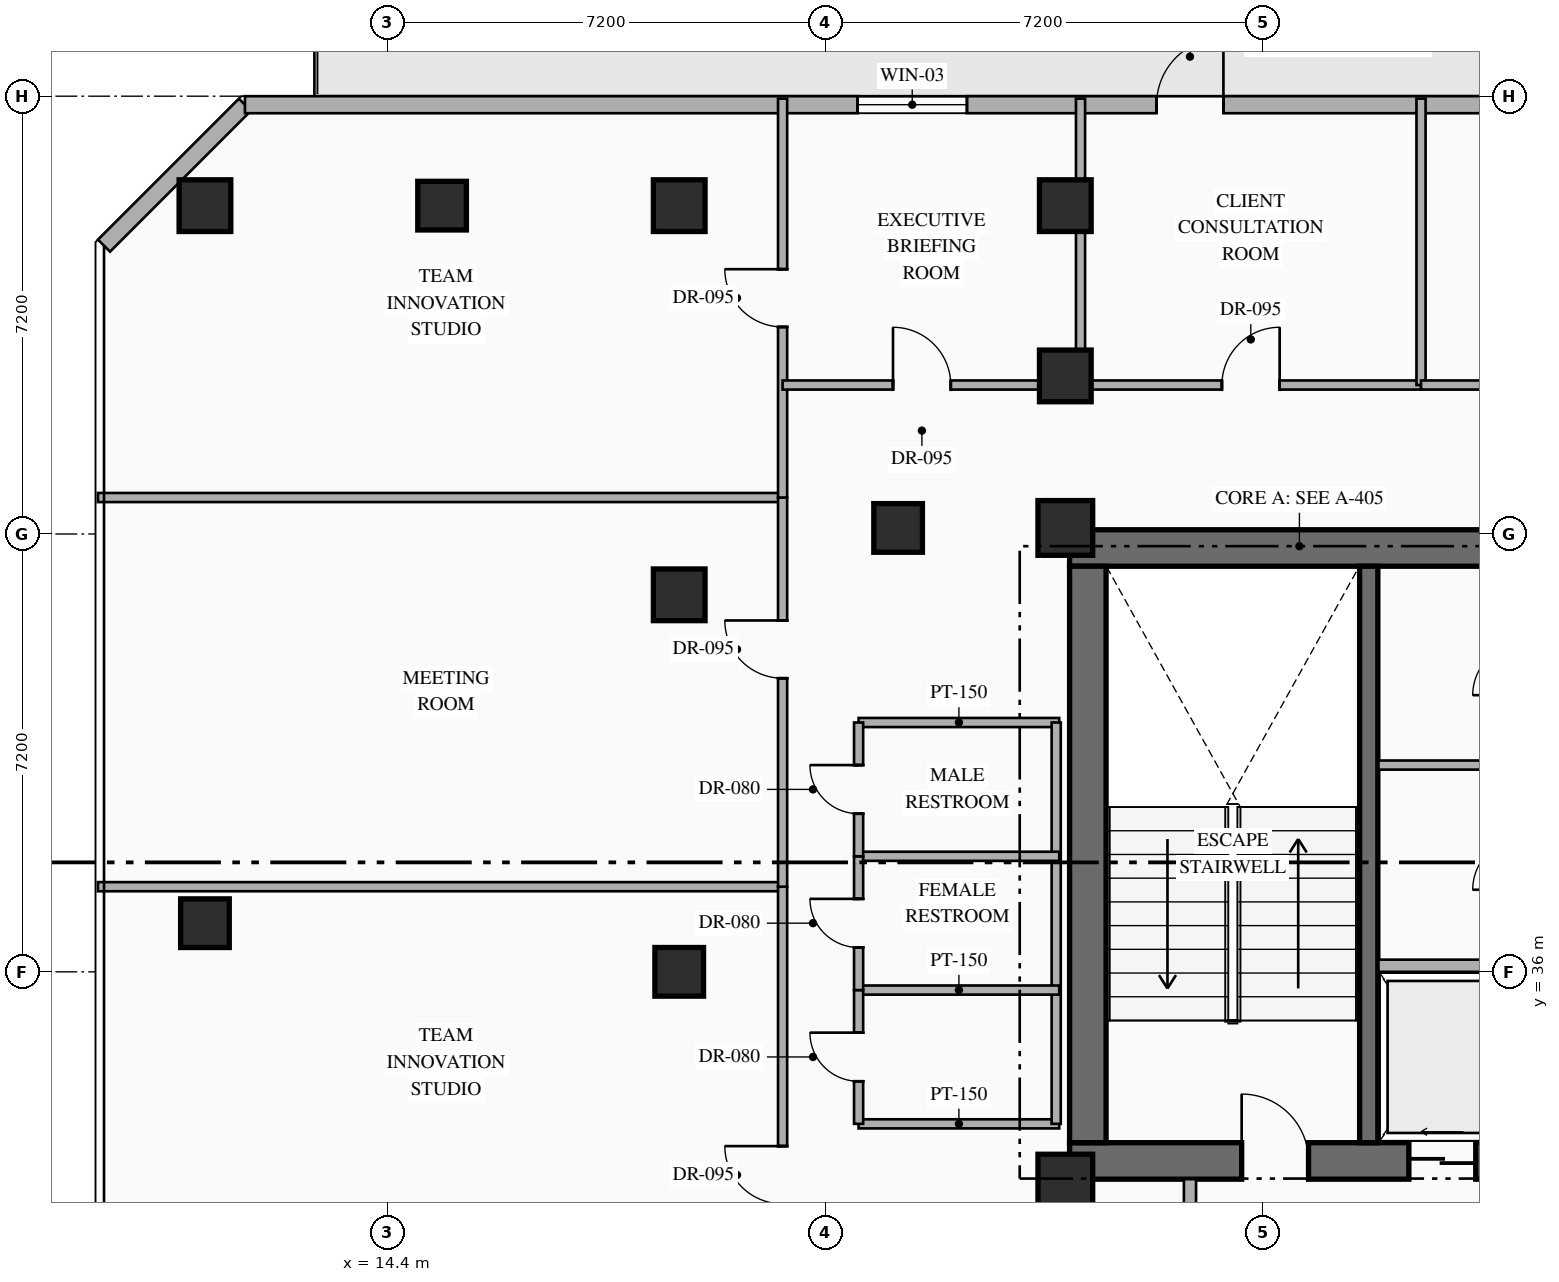
"""IFC4 building model, lengths in metres.
Left out: names, types, materials, properties, quantities, classifications, styles, units other than length and angle.
Written with IfcOpenShell. Run it as: python <this file> out.ifc"""

import sys

from ifc_helpers import new_model, si_unit, direction, frame, frame_2d, origin, origin_2d, place, context, subcontext, project, spatial, rectangle, hollow_rectangle, extrude, element, fill, save


model = new_model("IFC4")
c1 = context("Model", 3, precision=1e-05, world=origin(), true_north=direction((0.0, 1.0)))
c2 = subcontext(c1, "Body", "Model", "MODEL_VIEW")
j1 = project(units=[si_unit("LENGTHUNIT", "METRE"), si_unit("PLANEANGLEUNIT", "RADIAN")], contexts=[c1])
p1 = place(None, origin())
s1 = spatial("IfcSite", under=j1, at=p1, CompositionType="ELEMENT")
p2 = place(p1, origin())
s2 = spatial("IfcBuilding", under=s1, at=p2, CompositionType="ELEMENT")
p3 = place(p2, frame((0.0, 0.0, 145.65)))
s3 = spatial("IfcBuildingStorey", under=s2, at=p3, CompositionType="ELEMENT", Elevation=145.65)
p4 = place(p3, frame((25.62, 32.89, 0.0), z_axis=(0.0, 0.0, 1.0), x_axis=(1.0, 0.0, 0.0)))
e1 = element("IfcWall", 1, at=p4, inside=s3, PredefinedType="SHEAR", context=c2, shape_type="SweptSolid", body=[
    extrude(rectangle(XDim=7.78, YDim=0.6, at=frame_2d((3.89, 0.0))), origin(), (0.0, 0.0, 1.0), 3.6),
])
p5 = place(p4, frame((2.83, 0.0, 0.0)))
e2 = element("IfcOpeningElement", 2, at=p5, cuts=e1, PredefinedType="OPENING", context=c2, shape_type="SweptSolid", body=[
    extrude(rectangle(XDim=1.1, YDim=2.2, at=frame_2d((0.55, 1.1))), frame((0.0, 0.31, 0.0), z_axis=(0.0, -1.0, 0.0), x_axis=(1.0, 0.0, 0.0)), (0.0, 0.0, 1.0), 0.62),
])
p6 = place(p4, frame((5.58, 0.0, 0.0)))
e3 = element("IfcOpeningElement", 3, at=p6, cuts=e1, PredefinedType="OPENING", context=c2, shape_type="SweptSolid", body=[
    extrude(rectangle(XDim=1.1, YDim=2.15, at=frame_2d((0.55, 1.075))), frame((0.0, 0.31, 0.0), z_axis=(0.0, -1.0, 0.0), x_axis=(1.0, 0.0, 0.0)), (0.0, 0.0, 1.0), 0.62),
])
p7 = place(p3, frame((25.62, 42.97, 0.0), z_axis=(0.0, 0.0, 1.0), x_axis=(1.0, 0.0, 0.0)))
e4 = element("IfcWall", 4, at=p7, inside=s3, PredefinedType="SHEAR", context=c2, shape_type="SweptSolid", body=[
    extrude(rectangle(XDim=7.78, YDim=0.6, at=frame_2d((3.89, 0.0))), origin(), (0.0, 0.0, 1.0), 3.6),
])
p8 = place(p3, frame((25.92, 33.19, 0.0), z_axis=(0.0, 0.0, 1.0), x_axis=(0.0, 1.0, 0.0)))
e5 = element("IfcWall", 5, at=p8, inside=s3, PredefinedType="SHEAR", context=c2, shape_type="SweptSolid", body=[
    extrude(rectangle(XDim=9.48, YDim=0.6, at=frame_2d((4.74, 0.0))), origin(), (0.0, 0.0, 1.0), 3.6),
])
p9 = place(p3, frame((30.54, 33.19, 0.0), z_axis=(0.0, 0.0, 1.0), x_axis=(0.0, 1.0, 0.0)))
e6 = element("IfcWall", 6, at=p9, inside=s3, PredefinedType="SHEAR", context=c2, shape_type="SweptSolid", body=[
    extrude(rectangle(XDim=9.48, YDim=0.3, at=frame_2d((4.74, 0.0))), origin(), (0.0, 0.0, 1.0), 3.6),
])
for number, where, z_axis, x_axis in (
    (7, (25.55, 32.55, 0.0), (0.0, 0.0, 1.0), (1.0, 0.0, 0.0)),
    (8, (25.55, 43.3, 0.0), (0.0, 0.0, 1.0), (1.0, 0.0, 0.0)),
):
    element("IfcColumn", number, at=place(p3, frame(where, z_axis=z_axis, x_axis=x_axis)), inside=s3, PredefinedType="COLUMN", context=c2, shape_type="SweptSolid", body=[
        extrude(rectangle(XDim=0.9, YDim=0.9, at=origin_2d()), origin(), (0.0, 0.0, 1.0), 3.6),
    ])
for number, where, z_axis, x_axis in (
    (9, (25.55, 45.8, 0.0), (0.0, 0.0, 1.0), (1.0, 0.0, 0.0)),
    (10, (11.4, 48.6, 0.0), (0.0, 0.0, 1.0), (1.0, 0.0, 0.0)),
    (11, (19.2, 48.6, 0.0), (0.0, 0.0, 1.0), (1.0, 0.0, 0.0)),
    (12, (25.55, 48.6, 0.0), (0.0, 0.0, 1.0), (1.0, 0.0, 0.0)),
    (13, (19.2, 42.2, 0.0), (0.0, 0.0, 1.0), (1.0, 0.0, 0.0)),
):
    element("IfcColumn", number, at=place(p3, frame(where, z_axis=z_axis, x_axis=x_axis)), inside=s3, PredefinedType="COLUMN", context=c2, shape_type="SweptSolid", body=[
        extrude(hollow_rectangle(XDim=0.85, YDim=0.85, WallThickness=0.032, at=origin_2d()), origin(), (0.0, 0.0, 1.0), 3.6),
    ])
for number, where, z_axis, x_axis in (
    (14, (22.8, 43.3, 0.0), (0.0, 0.0, 1.0), (1.0, 0.0, 0.0)),
    (15, (11.4, 36.8, 0.0), (0.0, 0.0, 1.0), (1.0, 0.0, 0.0)),
    (16, (19.2, 36.0, 0.0), (0.0, 0.0, 1.0), (1.0, 0.0, 0.0)),
    (17, (15.3, 48.6, 0.0), (0.0, 0.0, 1.0), (1.0, 0.0, 0.0)),
):
    element("IfcColumn", number, at=place(p3, frame(where, z_axis=z_axis, x_axis=x_axis)), inside=s3, PredefinedType="COLUMN", context=c2, shape_type="SweptSolid", body=[
        extrude(hollow_rectangle(XDim=0.8, YDim=0.8, WallThickness=0.032, at=origin_2d()), origin(), (0.0, 0.0, 1.0), 3.6),
    ])
p10 = place(p3, frame((9.74, 47.942, 0.0), z_axis=(0.0, 0.0, 1.0), x_axis=(0.707106781187, 0.707106781187, 0.0)))
e18 = element("IfcWall", 18, at=p10, inside=s3, PredefinedType="STANDARD", context=c2, shape_type="SweptSolid", body=[
    extrude(rectangle(XDim=3.278, YDim=0.28, at=frame_2d((1.639, 0.0))), origin(), (0.0, 0.0, 1.0), 3.35),
])
p11 = place(p3, frame((12.058, 50.26, 0.0), z_axis=(0.0, 0.0, 1.0), x_axis=(1.0, 0.0, 0.0)))
e19 = element("IfcWall", 19, at=p11, inside=s3, PredefinedType="STANDARD", context=c2, shape_type="SweptSolid", body=[
    extrude(rectangle(XDim=30.484, YDim=0.28, at=frame_2d((15.242, 0.0))), origin(), (0.0, 0.0, 1.0), 3.35),
])
p12 = place(p11, frame((14.992, 0.0, 0.0)))
e20 = element("IfcOpeningElement", 20, at=p12, cuts=e19, PredefinedType="OPENING", context=c2, shape_type="SweptSolid", body=[
    extrude(rectangle(XDim=1.1, YDim=2.2, at=frame_2d((0.55, 1.1))), frame((0.0, 0.15, 0.0), z_axis=(0.0, -1.0, 0.0), x_axis=(1.0, 0.0, 0.0)), (0.0, 0.0, 1.0), 0.3),
])
p13 = place(p11, frame((10.074, 0.0, 0.85)))
e21 = element("IfcOpeningElement", 21, at=p13, cuts=e19, PredefinedType="OPENING", context=c2, shape_type="SweptSolid", body=[
    extrude(rectangle(XDim=1.8, YDim=2.1, at=frame_2d((0.9, 1.05))), frame((0.0, 0.15, 0.0), z_axis=(0.0, -1.0, 0.0), x_axis=(1.0, 0.0, 0.0)), (0.0, 0.0, 1.0), 0.3),
])
p14 = place(p3, frame((30.7, 36.1, 0.0), z_axis=(0.0, 0.0, 1.0), x_axis=(1.0, 0.0, 0.0)))
e22 = element("IfcWall", 22, at=p14, inside=s3, PredefinedType="STANDARD", context=c2, shape_type="SweptSolid", body=[
    extrude(rectangle(XDim=2.1, YDim=0.2, at=frame_2d((1.05, 0.0))), origin(), (0.0, 0.0, 1.0), 3.35),
])
p15 = place(p3, frame((30.7, 39.4, 0.0), z_axis=(0.0, 0.0, 1.0), x_axis=(1.0, 0.0, 0.0)))
e23 = element("IfcWall", 23, at=p15, inside=s3, PredefinedType="PARTITIONING", context=c2, shape_type="SweptSolid", body=[
    extrude(rectangle(XDim=2.1, YDim=0.15, at=frame_2d((1.05, 0.0))), origin(), (0.0, 0.0, 1.0), 3.35),
])
p16 = place(p3, frame((27.6, 29.2, 0.0), z_axis=(0.0, 0.0, 1.0), x_axis=(0.0, 1.0, 0.0)))
e24 = element("IfcWall", 24, at=p16, inside=s3, PredefinedType="STANDARD", context=c2, shape_type="SweptSolid", body=[
    extrude(rectangle(XDim=3.39, YDim=0.2, at=frame_2d((1.695, 0.0))), origin(), (0.0, 0.0, 1.0), 3.35),
])
for number, where, z_axis, x_axis in (
    (25, (22.15, 33.5, 0.0), (0.0, 0.0, 1.0), (1.0, 0.0, 0.0)),
    (26, (22.15, 40.1, 0.0), (0.0, 0.0, 1.0), (1.0, 0.0, 0.0)),
):
    element("IfcWall", number, at=place(p3, frame(where, z_axis=z_axis, x_axis=x_axis)), inside=s3, PredefinedType="PARTITIONING", context=c2, shape_type="SweptSolid", body=[
        extrude(rectangle(XDim=3.3, YDim=0.15, at=frame_2d((1.65, 0.0))), origin(), (0.0, 0.0, 1.0), 3.35),
    ])
p17 = place(p3, frame((25.4, 33.5, 0.0), z_axis=(0.0, 0.0, 1.0), x_axis=(0.0, 1.0, 0.0)))
e27 = element("IfcWall", 27, at=p17, inside=s3, PredefinedType="PARTITIONING", context=c2, shape_type="SweptSolid", body=[
    extrude(rectangle(XDim=6.6, YDim=0.15, at=frame_2d((3.3, 0.0))), origin(), (0.0, 0.0, 1.0), 3.35),
])
for number, where, z_axis, x_axis in (
    (28, (22.15, 35.7, 0.0), (0.0, 0.0, 1.0), (1.0, 0.0, 0.0)),
    (29, (22.15, 37.9, 0.0), (0.0, 0.0, 1.0), (1.0, 0.0, 0.0)),
):
    element("IfcWall", number, at=place(p3, frame(where, z_axis=z_axis, x_axis=x_axis)), inside=s3, PredefinedType="PARTITIONING", context=c2, shape_type="SweptSolid", body=[
        extrude(rectangle(XDim=3.3, YDim=0.15, at=frame_2d((1.65, 0.0))), origin(), (0.0, 0.0, 1.0), 3.35),
    ])
p18 = place(p3, frame((22.15, 33.5, 0.0), z_axis=(0.0, 0.0, 1.0), x_axis=(0.0, 1.0, 0.0)))
e30 = element("IfcWall", 30, at=p18, inside=s3, PredefinedType="PARTITIONING", context=c2, shape_type="SweptSolid", body=[
    extrude(rectangle(XDim=2.2, YDim=0.15, at=frame_2d((1.1, 0.0))), origin(), (0.0, 0.0, 1.0), 3.35),
])
p19 = place(p18, frame((0.7, 0.0, 0.0)))
e31 = element("IfcOpeningElement", 31, at=p19, cuts=e30, PredefinedType="OPENING", context=c2, shape_type="SweptSolid", body=[
    extrude(rectangle(XDim=0.8, YDim=2.06, at=frame_2d((0.4, 1.03))), frame((0.0, 0.085, 0.0), z_axis=(0.0, -1.0, 0.0), x_axis=(1.0, 0.0, 0.0)), (0.0, 0.0, 1.0), 0.17),
])
p20 = place(p3, frame((22.15, 35.7, 0.0), z_axis=(0.0, 0.0, 1.0), x_axis=(0.0, 1.0, 0.0)))
e32 = element("IfcWall", 32, at=p20, inside=s3, PredefinedType="PARTITIONING", context=c2, shape_type="SweptSolid", body=[
    extrude(rectangle(XDim=2.2, YDim=0.15, at=frame_2d((1.1, 0.0))), origin(), (0.0, 0.0, 1.0), 3.35),
])
p21 = place(p20, frame((0.7, 0.0, 0.0)))
e33 = element("IfcOpeningElement", 33, at=p21, cuts=e32, PredefinedType="OPENING", context=c2, shape_type="SweptSolid", body=[
    extrude(rectangle(XDim=0.8, YDim=2.06, at=frame_2d((0.4, 1.03))), frame((0.0, 0.085, 0.0), z_axis=(0.0, -1.0, 0.0), x_axis=(1.0, 0.0, 0.0)), (0.0, 0.0, 1.0), 0.17),
])
p22 = place(p3, frame((22.15, 37.9, 0.0), z_axis=(0.0, 0.0, 1.0), x_axis=(0.0, 1.0, 0.0)))
e34 = element("IfcWall", 34, at=p22, inside=s3, PredefinedType="PARTITIONING", context=c2, shape_type="SweptSolid", body=[
    extrude(rectangle(XDim=2.2, YDim=0.15, at=frame_2d((1.1, 0.0))), origin(), (0.0, 0.0, 1.0), 3.35),
])
p23 = place(p22, frame((0.7, 0.0, 0.0)))
e35 = element("IfcOpeningElement", 35, at=p23, cuts=e34, PredefinedType="OPENING", context=c2, shape_type="SweptSolid", body=[
    extrude(rectangle(XDim=0.8, YDim=2.06, at=frame_2d((0.4, 1.03))), frame((0.0, 0.085, 0.0), z_axis=(0.0, -1.0, 0.0), x_axis=(1.0, 0.0, 0.0)), (0.0, 0.0, 1.0), 0.17),
])
p24 = place(p3, frame((9.64, 37.4, 0.0), z_axis=(0.0, 0.0, 1.0), x_axis=(1.0, 0.0, 0.0)))
e36 = element("IfcWall", 36, at=p24, inside=s3, PredefinedType="PARTITIONING", context=c2, shape_type="SweptSolid", body=[
    extrude(rectangle(XDim=11.26, YDim=0.15, at=frame_2d((5.63, 0.0))), origin(), (0.0, 0.0, 1.0), 3.35),
])
p25 = place(p3, frame((20.9, 31.6, 0.0), z_axis=(0.0, 0.0, 1.0), x_axis=(0.0, 1.0, 0.0)))
e37 = element("IfcWall", 37, at=p25, inside=s3, PredefinedType="PARTITIONING", context=c2, shape_type="SweptSolid", body=[
    extrude(rectangle(XDim=5.8, YDim=0.15, at=frame_2d((2.9, 0.0))), origin(), (0.0, 0.0, 1.0), 3.35),
])
p26 = place(p25, frame((0.584, 0.0, 0.0)))
e38 = element("IfcOpeningElement", 38, at=p26, cuts=e37, PredefinedType="OPENING", context=c2, shape_type="SweptSolid", body=[
    extrude(rectangle(XDim=0.95, YDim=2.15, at=frame_2d((0.475, 1.075))), frame((0.0, 0.085, 0.0), z_axis=(0.0, -1.0, 0.0), x_axis=(1.0, 0.0, 0.0)), (0.0, 0.0, 1.0), 0.17),
])
p27 = place(p3, frame((9.64, 43.8, 0.0), z_axis=(0.0, 0.0, 1.0), x_axis=(1.0, 0.0, 0.0)))
e39 = element("IfcWall", 39, at=p27, inside=s3, PredefinedType="PARTITIONING", context=c2, shape_type="SweptSolid", body=[
    extrude(rectangle(XDim=11.26, YDim=0.15, at=frame_2d((5.63, 0.0))), origin(), (0.0, 0.0, 1.0), 3.35),
])
p28 = place(p3, frame((20.9, 37.4, 0.0), z_axis=(0.0, 0.0, 1.0), x_axis=(0.0, 1.0, 0.0)))
e40 = element("IfcWall", 40, at=p28, inside=s3, PredefinedType="PARTITIONING", context=c2, shape_type="SweptSolid", body=[
    extrude(rectangle(XDim=6.4, YDim=0.15, at=frame_2d((3.2, 0.0))), origin(), (0.0, 0.0, 1.0), 3.35),
])
p29 = place(p28, frame((3.428, 0.0, 0.0)))
e41 = element("IfcOpeningElement", 41, at=p29, cuts=e40, PredefinedType="OPENING", context=c2, shape_type="SweptSolid", body=[
    extrude(rectangle(XDim=0.95, YDim=2.15, at=frame_2d((0.475, 1.075))), frame((0.0, 0.085, 0.0), z_axis=(0.0, -1.0, 0.0), x_axis=(1.0, 0.0, 0.0)), (0.0, 0.0, 1.0), 0.17),
])
p30 = place(p3, frame((20.9, 43.8, 0.0), z_axis=(0.0, 0.0, 1.0), x_axis=(0.0, 1.0, 0.0)))
e42 = element("IfcWall", 42, at=p30, inside=s3, PredefinedType="PARTITIONING", context=c2, shape_type="SweptSolid", body=[
    extrude(rectangle(XDim=6.56, YDim=0.15, at=frame_2d((3.28, 0.0))), origin(), (0.0, 0.0, 1.0), 3.35),
])
p31 = place(p30, frame((2.805, 0.0, 0.0)))
e43 = element("IfcOpeningElement", 43, at=p31, cuts=e42, PredefinedType="OPENING", context=c2, shape_type="SweptSolid", body=[
    extrude(rectangle(XDim=0.95, YDim=2.15, at=frame_2d((0.475, 1.075))), frame((0.0, 0.085, 0.0), z_axis=(0.0, -1.0, 0.0), x_axis=(1.0, 0.0, 0.0)), (0.0, 0.0, 1.0), 0.17),
])
p32 = place(p3, frame((20.9, 45.65, 0.0), z_axis=(0.0, 0.0, 1.0), x_axis=(1.0, 0.0, 0.0)))
e44 = element("IfcWall", 44, at=p32, inside=s3, PredefinedType="PARTITIONING", context=c2, shape_type="SweptSolid", body=[
    extrude(rectangle(XDim=4.9, YDim=0.15, at=frame_2d((2.45, 0.0))), origin(), (0.0, 0.0, 1.0), 2.695),
])
p33 = place(p32, frame((1.816, 0.0, 0.0)))
e45 = element("IfcOpeningElement", 45, at=p33, cuts=e44, PredefinedType="OPENING", context=c2, shape_type="SweptSolid", body=[
    extrude(rectangle(XDim=0.95, YDim=2.15, at=frame_2d((0.475, 1.075))), frame((0.0, 0.085, 0.0), z_axis=(0.0, -1.0, 0.0), x_axis=(1.0, 0.0, 0.0)), (0.0, 0.0, 1.0), 0.17),
])
p34 = place(p3, frame((25.8, 45.65, 0.0), z_axis=(0.0, 0.0, 1.0), x_axis=(0.0, 1.0, 0.0)))
e46 = element("IfcWall", 46, at=p34, inside=s3, PredefinedType="PARTITIONING", context=c2, shape_type="SweptSolid", body=[
    extrude(rectangle(XDim=4.71, YDim=0.15, at=frame_2d((2.355, 0.0))), origin(), (0.0, 0.0, 1.0), 3.35),
])
p35 = place(p3, frame((25.8, 45.65, 0.0), z_axis=(0.0, 0.0, 1.0), x_axis=(1.0, 0.0, 0.0)))
e47 = element("IfcWall", 47, at=p35, inside=s3, PredefinedType="PARTITIONING", context=c2, shape_type="SweptSolid", body=[
    extrude(rectangle(XDim=5.6, YDim=0.15, at=frame_2d((2.8, 0.0))), origin(), (0.0, 0.0, 1.0), 2.695),
])
p36 = place(p35, frame((2.325, 0.0, 0.0)))
e48 = element("IfcOpeningElement", 48, at=p36, cuts=e47, PredefinedType="OPENING", context=c2, shape_type="SweptSolid", body=[
    extrude(rectangle(XDim=0.95, YDim=2.15, at=frame_2d((0.475, 1.075))), frame((0.0, 0.085, 0.0), z_axis=(0.0, -1.0, 0.0), x_axis=(1.0, 0.0, 0.0)), (0.0, 0.0, 1.0), 0.17),
])
p37 = place(p3, frame((31.4, 45.65, 0.0), z_axis=(0.0, 0.0, 1.0), x_axis=(0.0, 1.0, 0.0)))
e49 = element("IfcWall", 49, at=p37, inside=s3, PredefinedType="PARTITIONING", context=c2, shape_type="SweptSolid", body=[
    extrude(rectangle(XDim=4.71, YDim=0.15, at=frame_2d((2.355, 0.0))), origin(), (0.0, 0.0, 1.0), 3.35),
])
p38 = place(p3, frame((31.4, 45.65, 0.0), z_axis=(0.0, 0.0, 1.0), x_axis=(1.0, 0.0, 0.0)))
e50 = element("IfcWall", 50, at=p38, inside=s3, PredefinedType="PARTITIONING", context=c2, shape_type="SweptSolid", body=[
    extrude(rectangle(XDim=6.6, YDim=0.15, at=frame_2d((3.3, 0.0))), origin(), (0.0, 0.0, 1.0), 2.695),
])
p39 = place(p38, frame((5.026, 0.0, 0.0)))
e51 = element("IfcOpeningElement", 51, at=p39, cuts=e50, PredefinedType="OPENING", context=c2, shape_type="SweptSolid", body=[
    extrude(rectangle(XDim=0.95, YDim=2.15, at=frame_2d((0.475, 1.075))), frame((0.0, 0.085, 0.0), z_axis=(0.0, -1.0, 0.0), x_axis=(1.0, 0.0, 0.0)), (0.0, 0.0, 1.0), 0.17),
])
p40 = place(p12, origin())
e52 = element("IfcDoor", 52, at=p40, inside=s3, OperationType="SINGLE_SWING_RIGHT", PredefinedType="DOOR", context=c2, shape_type="SweptSolid", body=[
    extrude(rectangle(XDim=1.1, YDim=2.2, at=frame_2d((0.55, 1.1))), frame((0.0, 0.025, 0.0), z_axis=(0.0, -1.0, 0.0), x_axis=(1.0, 0.0, 0.0)), (0.0, 0.0, 1.0), 0.05),
])
fill(e20, e52)
p41 = place(p13, origin())
e53 = element("IfcWindow", 53, at=p41, inside=s3, PartitioningType="SINGLE_PANEL", PredefinedType="WINDOW", context=c2, shape_type="SweptSolid", body=[
    extrude(rectangle(XDim=1.8, YDim=2.1, at=frame_2d((0.9, 1.05))), frame((0.0, 0.03, 0.0), z_axis=(0.0, -1.0, 0.0), x_axis=(1.0, 0.0, 0.0)), (0.0, 0.0, 1.0), 0.06),
])
fill(e21, e53)
p42 = place(p5, origin())
e54 = element("IfcDoor", 54, at=p42, inside=s3, OperationType="SINGLE_SWING_LEFT", PredefinedType="DOOR", context=c2, shape_type="SweptSolid", body=[
    extrude(rectangle(XDim=1.1, YDim=2.2, at=frame_2d((0.55, 1.1))), frame((0.0, 0.025, 0.0), z_axis=(0.0, -1.0, 0.0), x_axis=(1.0, 0.0, 0.0)), (0.0, 0.0, 1.0), 0.05),
])
fill(e2, e54)
p43 = place(p6, origin())
e55 = element("IfcDoor", 55, at=p43, inside=s3, OperationType="SLIDING_TO_LEFT", PredefinedType="USERDEFINED", context=c2, shape_type="SweptSolid", body=[
    extrude(rectangle(XDim=1.1, YDim=2.15, at=frame_2d((0.55, 1.075))), frame((0.0, 0.025, 0.0), z_axis=(0.0, -1.0, 0.0), x_axis=(1.0, 0.0, 0.0)), (0.0, 0.0, 1.0), 0.05),
])
fill(e3, e55)
p44 = place(p19, origin())
e56 = element("IfcDoor", 56, at=p44, inside=s3, OperationType="SINGLE_SWING_RIGHT", PredefinedType="DOOR", context=c2, shape_type="SweptSolid", body=[
    extrude(rectangle(XDim=0.8, YDim=2.06, at=frame_2d((0.4, 1.03))), frame((0.0, 0.025, 0.0), z_axis=(0.0, -1.0, 0.0), x_axis=(1.0, 0.0, 0.0)), (0.0, 0.0, 1.0), 0.05),
])
fill(e31, e56)
p45 = place(p21, origin())
e57 = element("IfcDoor", 57, at=p45, inside=s3, OperationType="SINGLE_SWING_RIGHT", PredefinedType="DOOR", context=c2, shape_type="SweptSolid", body=[
    extrude(rectangle(XDim=0.8, YDim=2.06, at=frame_2d((0.4, 1.03))), frame((0.0, 0.025, 0.0), z_axis=(0.0, -1.0, 0.0), x_axis=(1.0, 0.0, 0.0)), (0.0, 0.0, 1.0), 0.05),
])
fill(e33, e57)
p46 = place(p23, origin())
e58 = element("IfcDoor", 58, at=p46, inside=s3, OperationType="SINGLE_SWING_RIGHT", PredefinedType="DOOR", context=c2, shape_type="SweptSolid", body=[
    extrude(rectangle(XDim=0.8, YDim=2.06, at=frame_2d((0.4, 1.03))), frame((0.0, 0.025, 0.0), z_axis=(0.0, -1.0, 0.0), x_axis=(1.0, 0.0, 0.0)), (0.0, 0.0, 1.0), 0.05),
])
fill(e35, e58)
p47 = place(p26, origin())
e59 = element("IfcDoor", 59, at=p47, inside=s3, OperationType="SINGLE_SWING_RIGHT", PredefinedType="DOOR", context=c2, shape_type="SweptSolid", body=[
    extrude(rectangle(XDim=0.95, YDim=2.15, at=frame_2d((0.475, 1.075))), frame((0.0, 0.025, 0.0), z_axis=(0.0, -1.0, 0.0), x_axis=(1.0, 0.0, 0.0)), (0.0, 0.0, 1.0), 0.05),
])
fill(e38, e59)
p48 = place(p29, origin())
e60 = element("IfcDoor", 60, at=p48, inside=s3, OperationType="SINGLE_SWING_RIGHT", PredefinedType="DOOR", context=c2, shape_type="SweptSolid", body=[
    extrude(rectangle(XDim=0.95, YDim=2.15, at=frame_2d((0.475, 1.075))), frame((0.0, 0.025, 0.0), z_axis=(0.0, -1.0, 0.0), x_axis=(1.0, 0.0, 0.0)), (0.0, 0.0, 1.0), 0.05),
])
fill(e41, e60)
p49 = place(p31, origin())
e61 = element("IfcDoor", 61, at=p49, inside=s3, OperationType="SINGLE_SWING_RIGHT", PredefinedType="DOOR", context=c2, shape_type="SweptSolid", body=[
    extrude(rectangle(XDim=0.95, YDim=2.15, at=frame_2d((0.475, 1.075))), frame((0.0, 0.025, 0.0), z_axis=(0.0, -1.0, 0.0), x_axis=(1.0, 0.0, 0.0)), (0.0, 0.0, 1.0), 0.05),
])
fill(e43, e61)
p50 = place(p33, origin())
e62 = element("IfcDoor", 62, at=p50, inside=s3, OperationType="SINGLE_SWING_LEFT", PredefinedType="DOOR", context=c2, shape_type="SweptSolid", body=[
    extrude(rectangle(XDim=0.95, YDim=2.15, at=frame_2d((0.475, 1.075))), frame((0.0, 0.025, 0.0), z_axis=(0.0, -1.0, 0.0), x_axis=(1.0, 0.0, 0.0)), (0.0, 0.0, 1.0), 0.05),
])
fill(e45, e62)
p51 = place(p36, origin())
e63 = element("IfcDoor", 63, at=p51, inside=s3, OperationType="SINGLE_SWING_RIGHT", PredefinedType="DOOR", context=c2, shape_type="SweptSolid", body=[
    extrude(rectangle(XDim=0.95, YDim=2.15, at=frame_2d((0.475, 1.075))), frame((0.0, 0.025, 0.0), z_axis=(0.0, -1.0, 0.0), x_axis=(1.0, 0.0, 0.0)), (0.0, 0.0, 1.0), 0.05),
])
fill(e48, e63)
save(model, sys.argv[1])
